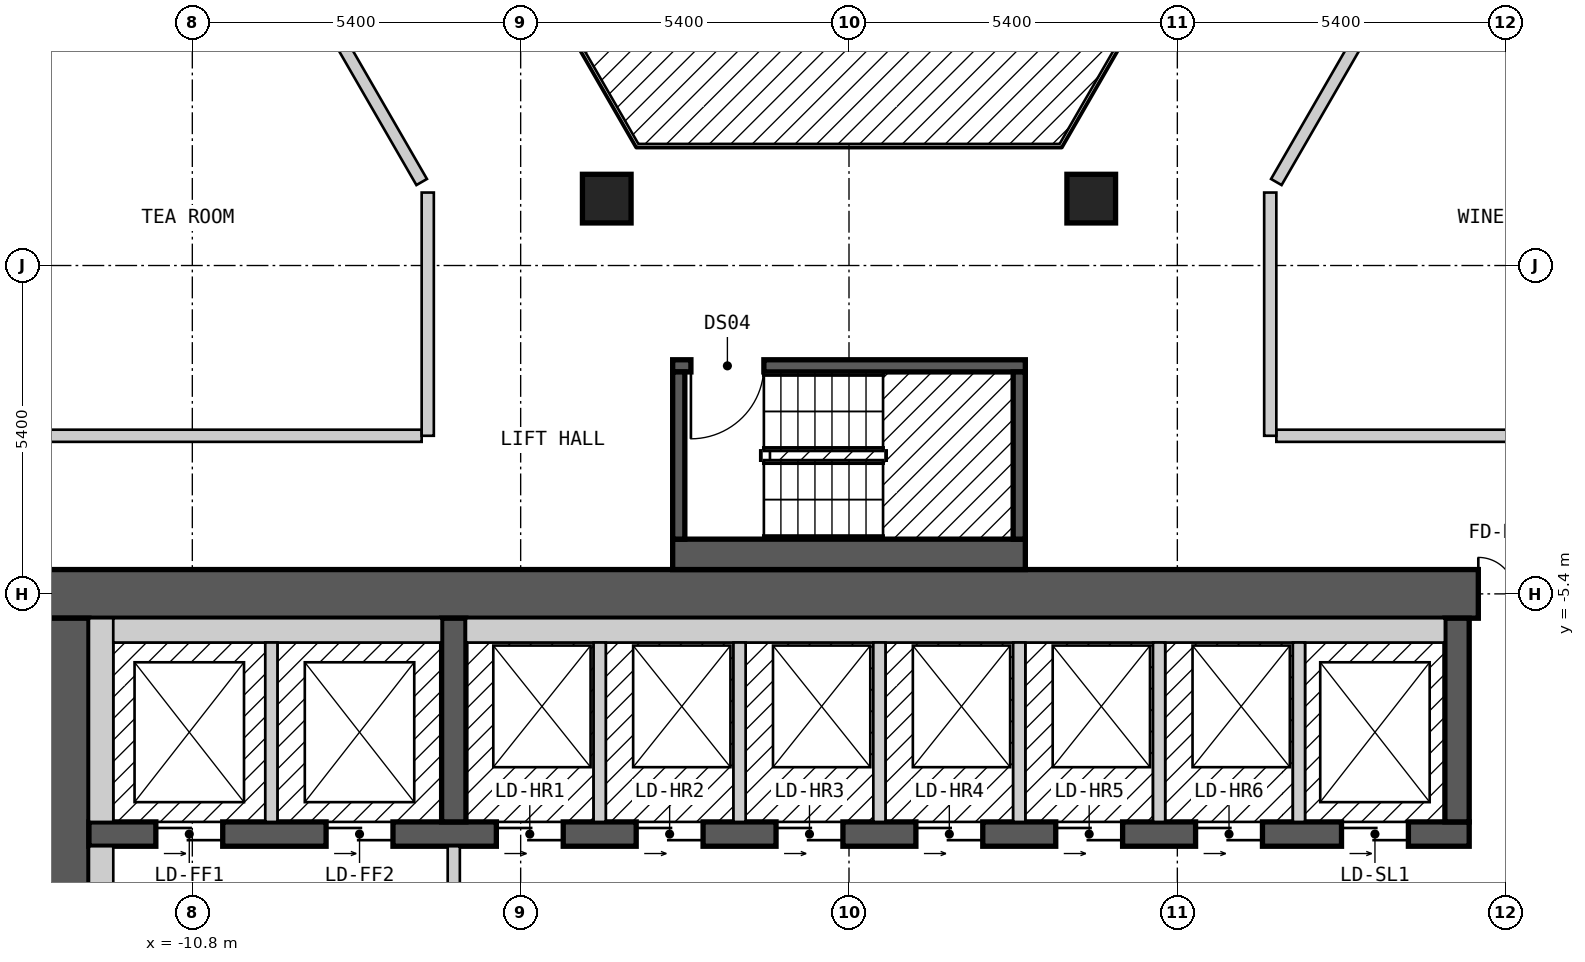
"""IFC4 building model, lengths in metres.
Left out: names, types, materials, properties, quantities, classifications, styles, units other than length and angle.
Written with IfcOpenShell. Run it as: python <this file> out.ifc"""

import sys

from ifc_helpers import new_model, si_unit, direction, frame, frame_2d, origin, origin_2d, place, context, subcontext, project, spatial, rectangle, extrude, element, fill, save


model = new_model("IFC4")
c1 = context("Model", 3, precision=1e-05, world=origin(), true_north=direction((0.0, 1.0)))
c2 = subcontext(c1, "Body", "Model", "MODEL_VIEW")
j1 = project(units=[si_unit("LENGTHUNIT", "METRE"), si_unit("PLANEANGLEUNIT", "RADIAN")], contexts=[c1])
p1 = place(None, origin())
s1 = spatial("IfcSite", under=j1, at=p1, CompositionType="ELEMENT")
p2 = place(p1, origin())
s2 = spatial("IfcBuilding", under=s1, at=p2, CompositionType="ELEMENT")
p3 = place(p2, frame((0.0, 0.0, 117.6)))
s3 = spatial("IfcBuildingStorey", under=s2, at=p3, CompositionType="ELEMENT", Elevation=117.6)
for number, where, z_axis, x_axis in (
    (1, (3.984, 1.1, 0.0), (0.0, 0.0, 1.0), (1.0, 0.0, 0.0)),
    (2, (-3.984, 1.1, 0.0), (0.0, 0.0, 1.0), (1.0, 0.0, 0.0)),
):
    element("IfcColumn", number, at=place(p3, frame(where, z_axis=z_axis, x_axis=x_axis)), inside=s3, PredefinedType="COLUMN", context=c2, shape_type="SweptSolid", body=[
        extrude(rectangle(XDim=0.8, YDim=0.8, at=origin_2d()), origin(), (0.0, 0.0, 1.0), 3.0),
    ])
p4 = place(p3, frame((-13.3, -5.4, 0.0), z_axis=(0.0, 0.0, 1.0), x_axis=(1.0, 0.0, 0.0)))
e3 = element("IfcWall", 3, at=p4, inside=s3, PredefinedType="SHEAR", context=c2, shape_type="SweptSolid", body=[
    extrude(rectangle(XDim=26.6, YDim=0.8, at=frame_2d((13.3, 0.0))), origin(), (0.0, 0.0, 1.0), 2.7),
])
p5 = place(p4, frame((23.65, 0.0, 0.0)))
e4 = element("IfcOpeningElement", 4, at=p5, cuts=e3, PredefinedType="OPENING", context=c2, shape_type="SweptSolid", body=[
    extrude(rectangle(XDim=1.2, YDim=2.1, at=frame_2d((0.6, 1.05))), frame((0.0, 0.41, 0.0), z_axis=(0.0, -1.0, 0.0), x_axis=(1.0, 0.0, 0.0)), (0.0, 0.0, 1.0), 0.82),
])
p6 = place(p3, frame((-12.9, -18.2, 0.0), z_axis=(0.0, 0.0, 1.0), x_axis=(0.0, 1.0, 0.0)))
e5 = element("IfcWall", 5, at=p6, inside=s3, PredefinedType="SHEAR", context=c2, shape_type="SweptSolid", body=[
    extrude(rectangle(XDim=12.4, YDim=0.8, at=frame_2d((6.2, 0.0))), origin(), (0.0, 0.0, 1.0), 2.7),
])
p7 = place(p6, frame((4.0, 0.0, 0.0)))
e6 = element("IfcOpeningElement", 6, at=p7, cuts=e5, PredefinedType="OPENING", context=c2, shape_type="SweptSolid", body=[
    extrude(rectangle(XDim=1.2, YDim=2.1, at=frame_2d((0.6, 1.05))), frame((0.0, 0.41, 0.0), z_axis=(0.0, -1.0, 0.0), x_axis=(1.0, 0.0, 0.0)), (0.0, 0.0, 1.0), 0.82),
])
p8 = place(p3, frame((-12.5, -9.35, 0.0), z_axis=(0.0, 0.0, 1.0), x_axis=(1.0, 0.0, 0.0)))
e7 = element("IfcWall", 7, at=p8, inside=s3, PredefinedType="SHEAR", context=c2, shape_type="SweptSolid", body=[
    extrude(rectangle(XDim=22.7, YDim=0.4, at=frame_2d((11.35, 0.0))), origin(), (0.0, 0.0, 1.0), 2.7),
])
p9 = place(p8, frame((1.1, 0.0, 0.0)))
e8 = element("IfcOpeningElement", 8, at=p9, cuts=e7, PredefinedType="OPENING", context=c2, shape_type="SweptSolid", body=[
    extrude(rectangle(XDim=1.1, YDim=2.1, at=frame_2d((0.55, 1.05))), frame((0.0, 0.21, 0.0), z_axis=(0.0, -1.0, 0.0), x_axis=(1.0, 0.0, 0.0)), (0.0, 0.0, 1.0), 0.42),
])
p10 = place(p8, frame((3.9, 0.0, 0.0)))
e9 = element("IfcOpeningElement", 9, at=p10, cuts=e7, PredefinedType="OPENING", context=c2, shape_type="SweptSolid", body=[
    extrude(rectangle(XDim=1.1, YDim=2.1, at=frame_2d((0.55, 1.05))), frame((0.0, 0.21, 0.0), z_axis=(0.0, -1.0, 0.0), x_axis=(1.0, 0.0, 0.0)), (0.0, 0.0, 1.0), 0.42),
])
p11 = place(p8, frame((6.7, 0.0, 0.0)))
e10 = element("IfcOpeningElement", 10, at=p11, cuts=e7, PredefinedType="OPENING", context=c2, shape_type="SweptSolid", body=[
    extrude(rectangle(XDim=1.1, YDim=2.1, at=frame_2d((0.55, 1.05))), frame((0.0, 0.21, 0.0), z_axis=(0.0, -1.0, 0.0), x_axis=(1.0, 0.0, 0.0)), (0.0, 0.0, 1.0), 0.42),
])
p12 = place(p8, frame((9.0, 0.0, 0.0)))
e11 = element("IfcOpeningElement", 11, at=p12, cuts=e7, PredefinedType="OPENING", context=c2, shape_type="SweptSolid", body=[
    extrude(rectangle(XDim=1.1, YDim=2.1, at=frame_2d((0.55, 1.05))), frame((0.0, 0.21, 0.0), z_axis=(0.0, -1.0, 0.0), x_axis=(1.0, 0.0, 0.0)), (0.0, 0.0, 1.0), 0.42),
])
p13 = place(p8, frame((11.3, 0.0, 0.0)))
e12 = element("IfcOpeningElement", 12, at=p13, cuts=e7, PredefinedType="OPENING", context=c2, shape_type="SweptSolid", body=[
    extrude(rectangle(XDim=1.1, YDim=2.1, at=frame_2d((0.55, 1.05))), frame((0.0, 0.21, 0.0), z_axis=(0.0, -1.0, 0.0), x_axis=(1.0, 0.0, 0.0)), (0.0, 0.0, 1.0), 0.42),
])
p14 = place(p8, frame((13.6, 0.0, 0.0)))
e13 = element("IfcOpeningElement", 13, at=p14, cuts=e7, PredefinedType="OPENING", context=c2, shape_type="SweptSolid", body=[
    extrude(rectangle(XDim=1.1, YDim=2.1, at=frame_2d((0.55, 1.05))), frame((0.0, 0.21, 0.0), z_axis=(0.0, -1.0, 0.0), x_axis=(1.0, 0.0, 0.0)), (0.0, 0.0, 1.0), 0.42),
])
p15 = place(p8, frame((15.9, 0.0, 0.0)))
e14 = element("IfcOpeningElement", 14, at=p15, cuts=e7, PredefinedType="OPENING", context=c2, shape_type="SweptSolid", body=[
    extrude(rectangle(XDim=1.1, YDim=2.1, at=frame_2d((0.55, 1.05))), frame((0.0, 0.21, 0.0), z_axis=(0.0, -1.0, 0.0), x_axis=(1.0, 0.0, 0.0)), (0.0, 0.0, 1.0), 0.42),
])
p16 = place(p8, frame((18.2, 0.0, 0.0)))
e15 = element("IfcOpeningElement", 15, at=p16, cuts=e7, PredefinedType="OPENING", context=c2, shape_type="SweptSolid", body=[
    extrude(rectangle(XDim=1.1, YDim=2.1, at=frame_2d((0.55, 1.05))), frame((0.0, 0.21, 0.0), z_axis=(0.0, -1.0, 0.0), x_axis=(1.0, 0.0, 0.0)), (0.0, 0.0, 1.0), 0.42),
])
p17 = place(p8, frame((20.6, 0.0, 0.0)))
e16 = element("IfcOpeningElement", 16, at=p17, cuts=e7, PredefinedType="OPENING", context=c2, shape_type="SweptSolid", body=[
    extrude(rectangle(XDim=1.1, YDim=2.1, at=frame_2d((0.55, 1.05))), frame((0.0, 0.21, 0.0), z_axis=(0.0, -1.0, 0.0), x_axis=(1.0, 0.0, 0.0)), (0.0, 0.0, 1.0), 0.42),
])
for number, where, z_axis, x_axis in (
    (17, (-6.5, -9.15, 0.0), (0.0, 0.0, 1.0), (0.0, 1.0, 0.0)),
    (18, (10.0, -9.15, 0.0), (0.0, 0.0, 1.0), (0.0, 1.0, 0.0)),
):
    element("IfcWall", number, at=place(p3, frame(where, z_axis=z_axis, x_axis=x_axis)), inside=s3, PredefinedType="SHEAR", context=c2, shape_type="SweptSolid", body=[
        extrude(rectangle(XDim=3.35, YDim=0.4, at=frame_2d((1.675, 0.0))), origin(), (0.0, 0.0, 1.0), 2.7),
    ])
p18 = place(p3, frame((-2.9, -4.75, 0.0), z_axis=(0.0, 0.0, 1.0), x_axis=(1.0, 0.0, 0.0)))
e19 = element("IfcWall", 19, at=p18, inside=s3, PredefinedType="SOLIDWALL", context=c2, shape_type="SweptSolid", body=[
    extrude(rectangle(XDim=5.8, YDim=0.5, at=frame_2d((2.9, 0.0))), origin(), (0.0, 0.0, 1.0), 2.7),
])
p19 = place(p3, frame((-2.9, -1.65, 0.0), z_axis=(0.0, 0.0, 1.0), x_axis=(1.0, 0.0, 0.0)))
e20 = element("IfcWall", 20, at=p19, inside=s3, PredefinedType="SOLIDWALL", context=c2, shape_type="SweptSolid", body=[
    extrude(rectangle(XDim=5.8, YDim=0.2, at=frame_2d((2.9, 0.0))), origin(), (0.0, 0.0, 1.0), 2.7),
])
p20 = place(p19, frame((0.3, 0.0, 0.0)))
e21 = element("IfcOpeningElement", 21, at=p20, cuts=e20, PredefinedType="OPENING", context=c2, shape_type="SweptSolid", body=[
    extrude(rectangle(XDim=1.2, YDim=2.1, at=frame_2d((0.6, 1.05))), frame((0.0, 0.11, 0.0), z_axis=(0.0, -1.0, 0.0), x_axis=(1.0, 0.0, 0.0)), (0.0, 0.0, 1.0), 0.22),
])
for number, where, z_axis, x_axis in (
    (22, (-2.8, -4.5, 0.0), (0.0, 0.0, 1.0), (0.0, 1.0, 0.0)),
    (23, (2.8, -4.5, 0.0), (0.0, 0.0, 1.0), (0.0, 1.0, 0.0)),
):
    element("IfcWall", number, at=place(p3, frame(where, z_axis=z_axis, x_axis=x_axis)), inside=s3, PredefinedType="SOLIDWALL", context=c2, shape_type="SweptSolid", body=[
        extrude(rectangle(XDim=2.75, YDim=0.2, at=frame_2d((1.375, 0.0))), origin(), (0.0, 0.0, 1.0), 2.7),
    ])
p21 = place(p3, frame((-10.796, 7.9, 0.0), z_axis=(0.0, 0.0, 1.0), x_axis=(0.499954271211, -0.866051803703, 0.0)))
e24 = element("IfcWall", 24, at=p21, inside=s3, PredefinedType="PARTITIONING", context=c2, shape_type="SweptSolid", body=[
    extrude(rectangle(XDim=7.536, YDim=0.2, at=frame_2d((3.768, 0.0))), origin(), (0.0, 0.0, 1.0), 2.7),
])
p22 = place(p3, frame((7.967, 13.0, 0.0), z_axis=(0.0, 0.0, 1.0), x_axis=(0.50003774998, -0.866003607726, 0.0)))
e25 = element("IfcWall", 25, at=p22, inside=s3, PredefinedType="PARTITIONING", context=c2, shape_type="SweptSolid", body=[
    extrude(rectangle(XDim=14.433, YDim=0.2, at=frame_2d((7.217, 0.0))), origin(), (0.0, 0.0, 1.0), 2.7),
])
p23 = place(p22, frame((6.824, 0.0, 0.0)))
e26 = element("IfcOpeningElement", 26, at=p23, cuts=e25, PredefinedType="OPENING", context=c2, shape_type="SweptSolid", body=[
    extrude(rectangle(XDim=0.9, YDim=2.1, at=frame_2d((0.45, 1.05))), frame((0.0, 0.11, 0.0), z_axis=(0.0, -1.0, 0.0), x_axis=(1.0, 0.0, 0.0)), (0.0, 0.0, 1.0), 0.22),
])
p24 = place(p3, frame((9.296, 15.1, 0.0), z_axis=(0.0, 0.0, 1.0), x_axis=(0.499974024244, -0.866040400375, 0.0)))
e27 = element("IfcWall", 27, at=p24, inside=s3, PredefinedType="PARTITIONING", context=c2, shape_type="SweptSolid", body=[
    extrude(rectangle(XDim=16.857, YDim=0.2, at=frame_2d((8.429, 0.0))), origin(), (0.0, 0.0, 1.0), 2.7),
])
p25 = place(p24, frame((5.187, 0.0, 0.0)))
e28 = element("IfcOpeningElement", 28, at=p25, cuts=e27, PredefinedType="OPENING", context=c2, shape_type="SweptSolid", body=[
    extrude(rectangle(XDim=1.0, YDim=2.1, at=frame_2d((0.5, 1.05))), frame((0.0, 0.11, 0.0), z_axis=(0.0, -1.0, 0.0), x_axis=(1.0, 0.0, 0.0)), (0.0, 0.0, 1.0), 0.22),
])
p26 = place(p3, frame((-13.395, -2.8, 0.0), z_axis=(0.0, 0.0, 1.0), x_axis=(1.0, 0.0, 0.0)))
e29 = element("IfcWall", 29, at=p26, inside=s3, PredefinedType="PARTITIONING", context=c2, shape_type="SweptSolid", body=[
    extrude(rectangle(XDim=6.367, YDim=0.2, at=frame_2d((3.184, 0.0))), origin(), (0.0, 0.0, 1.0), 2.7),
])
p27 = place(p3, frame((7.028, -2.8, 0.0), z_axis=(0.0, 0.0, 1.0), x_axis=(1.0, 0.0, 0.0)))
e30 = element("IfcWall", 30, at=p27, inside=s3, PredefinedType="PARTITIONING", context=c2, shape_type="SweptSolid", body=[
    extrude(rectangle(XDim=6.25, YDim=0.2, at=frame_2d((3.125, 0.0))), origin(), (0.0, 0.0, 1.0), 2.7),
])
p28 = place(p3, frame((7.028, 1.373, 0.0), z_axis=(0.0, 0.0, 1.0), x_axis=(0.499954271211, 0.866051803703, 0.0)))
e31 = element("IfcWall", 31, at=p28, inside=s3, PredefinedType="PARTITIONING", context=c2, shape_type="SweptSolid", body=[
    extrude(rectangle(XDim=7.536, YDim=0.2, at=frame_2d((3.768, 0.0))), origin(), (0.0, 0.0, 1.0), 2.7),
])
p29 = place(p3, frame((-15.242, 0.399, 0.0), z_axis=(0.0, 0.0, 1.0), x_axis=(0.499953615651, 0.866052182145, 0.0)))
e32 = element("IfcWall", 32, at=p29, inside=s3, PredefinedType="PARTITIONING", context=c2, shape_type="SweptSolid", body=[
    extrude(rectangle(XDim=8.777, YDim=0.2, at=frame_2d((4.388, 0.0))), origin(), (0.0, 0.0, 1.0), 2.7),
])
p30 = place(p29, frame((3.938, 0.0, 0.0)))
e33 = element("IfcOpeningElement", 33, at=p30, cuts=e32, PredefinedType="OPENING", context=c2, shape_type="SweptSolid", body=[
    extrude(rectangle(XDim=0.9, YDim=2.1, at=frame_2d((0.45, 1.05))), frame((0.0, 0.11, 0.0), z_axis=(0.0, -1.0, 0.0), x_axis=(1.0, 0.0, 0.0)), (0.0, 0.0, 1.0), 0.22),
])
p31 = place(p3, frame((-17.753, 0.45, 0.0), z_axis=(0.0, 0.0, 1.0), x_axis=(0.499988552313, 0.866032013009, 0.0)))
e34 = element("IfcWall", 34, at=p31, inside=s3, PredefinedType="PARTITIONING", context=c2, shape_type="SweptSolid", body=[
    extrude(rectangle(XDim=16.917, YDim=0.2, at=frame_2d((8.458, 0.0))), origin(), (0.0, 0.0, 1.0), 2.7),
])
p32 = place(p31, frame((10.73, 0.0, 0.0)))
e35 = element("IfcOpeningElement", 35, at=p32, cuts=e34, PredefinedType="OPENING", context=c2, shape_type="SweptSolid", body=[
    extrude(rectangle(XDim=1.0, YDim=2.1, at=frame_2d((0.5, 1.05))), frame((0.0, 0.11, 0.0), z_axis=(0.0, -1.0, 0.0), x_axis=(1.0, 0.0, 0.0)), (0.0, 0.0, 1.0), 0.22),
])
p33 = place(p31, frame((0.594, 0.0, 0.0)))
e36 = element("IfcOpeningElement", 36, at=p33, cuts=e34, PredefinedType="OPENING", context=c2, shape_type="SweptSolid", body=[
    extrude(rectangle(XDim=1.0, YDim=2.1, at=frame_2d((0.5, 1.05))), frame((0.0, 0.11, 0.0), z_axis=(0.0, -1.0, 0.0), x_axis=(1.0, 0.0, 0.0)), (0.0, 0.0, 1.0), 0.22),
])
for number, where, z_axis, x_axis in (
    (37, (6.928, -2.8, 0.0), (0.0, 0.0, 1.0), (0.0, 1.0, 0.0)),
    (38, (-6.928, -2.8, 0.0), (0.0, 0.0, 1.0), (0.0, 1.0, 0.0)),
):
    element("IfcWall", number, at=place(p3, frame(where, z_axis=z_axis, x_axis=x_axis)), inside=s3, PredefinedType="PARTITIONING", context=c2, shape_type="SweptSolid", body=[
        extrude(rectangle(XDim=4.0, YDim=0.2, at=frame_2d((2.0, 0.0))), origin(), (0.0, 0.0, 1.0), 2.7),
    ])
p34 = place(p3, frame((-12.3, -13.0, 0.0), z_axis=(0.0, 0.0, 1.0), x_axis=(0.0, 1.0, 0.0)))
e39 = element("IfcWall", 39, at=p34, inside=s3, PredefinedType="PARTITIONING", context=c2, shape_type="SweptSolid", body=[
    extrude(rectangle(XDim=3.45, YDim=0.4, at=frame_2d((1.725, 0.0))), origin(), (0.0, 0.0, 1.0), 2.7),
])
p35 = place(p3, frame((-12.3, -9.15, 0.0), z_axis=(0.0, 0.0, 1.0), x_axis=(0.0, 1.0, 0.0)))
e40 = element("IfcWall", 40, at=p35, inside=s3, PredefinedType="SOLIDWALL", context=c2, shape_type="SweptSolid", body=[
    extrude(rectangle(XDim=3.35, YDim=0.4, at=frame_2d((1.675, 0.0))), origin(), (0.0, 0.0, 1.0), 2.7),
])
p36 = place(p3, frame((-12.1, -6.0, 0.0), z_axis=(0.0, 0.0, 1.0), x_axis=(1.0, 0.0, 0.0)))
e41 = element("IfcWall", 41, at=p36, inside=s3, PredefinedType="SOLIDWALL", context=c2, shape_type="SweptSolid", body=[
    extrude(rectangle(XDim=5.4, YDim=0.4, at=frame_2d((2.7, 0.0))), origin(), (0.0, 0.0, 1.0), 2.7),
])
p37 = place(p3, frame((-9.5, -9.15, 0.0), z_axis=(0.0, 0.0, 1.0), x_axis=(0.0, 1.0, 0.0)))
e42 = element("IfcWall", 42, at=p37, inside=s3, PredefinedType="SOLIDWALL", context=c2, shape_type="SweptSolid", body=[
    extrude(rectangle(XDim=2.95, YDim=0.2, at=frame_2d((1.475, 0.0))), origin(), (0.0, 0.0, 1.0), 2.7),
])
p38 = place(p3, frame((-6.5, -14.45, 0.0), z_axis=(0.0, 0.0, 1.0), x_axis=(0.0, 1.0, 0.0)))
e43 = element("IfcWall", 43, at=p38, inside=s3, PredefinedType="PARTITIONING", context=c2, shape_type="SweptSolid", body=[
    extrude(rectangle(XDim=4.9, YDim=0.2, at=frame_2d((2.45, 0.0))), origin(), (0.0, 0.0, 1.0), 2.7),
])
p39 = place(p38, frame((3.15, 0.0, 0.0), z_axis=(0.0, 0.0, 1.0), x_axis=(-1.0, 0.0, 0.0)))
e44 = element("IfcOpeningElement", 44, at=p39, cuts=e43, PredefinedType="OPENING", context=c2, shape_type="SweptSolid", body=[
    extrude(rectangle(XDim=1.4, YDim=2.1, at=frame_2d((0.7, 1.05))), frame((0.0, 0.11, 0.0), z_axis=(0.0, -1.0, 0.0), x_axis=(1.0, 0.0, 0.0)), (0.0, 0.0, 1.0), 0.22),
])
p40 = place(p3, frame((-6.3, -6.0, 0.0), z_axis=(0.0, 0.0, 1.0), x_axis=(1.0, 0.0, 0.0)))
e45 = element("IfcWall", 45, at=p40, inside=s3, PredefinedType="SOLIDWALL", context=c2, shape_type="SweptSolid", body=[
    extrude(rectangle(XDim=16.1, YDim=0.4, at=frame_2d((8.05, 0.0))), origin(), (0.0, 0.0, 1.0), 2.7),
])
for number, where, z_axis, x_axis in (
    (46, (-4.1, -9.15, 0.0), (0.0, 0.0, 1.0), (0.0, 1.0, 0.0)),
    (47, (-1.8, -9.15, 0.0), (0.0, 0.0, 1.0), (0.0, 1.0, 0.0)),
    (48, (0.5, -9.15, 0.0), (0.0, 0.0, 1.0), (0.0, 1.0, 0.0)),
    (49, (2.8, -9.15, 0.0), (0.0, 0.0, 1.0), (0.0, 1.0, 0.0)),
    (50, (5.1, -9.15, 0.0), (0.0, 0.0, 1.0), (0.0, 1.0, 0.0)),
    (51, (7.4, -9.15, 0.0), (0.0, 0.0, 1.0), (0.0, 1.0, 0.0)),
):
    element("IfcWall", number, at=place(p3, frame(where, z_axis=z_axis, x_axis=x_axis)), inside=s3, PredefinedType="SOLIDWALL", context=c2, shape_type="SweptSolid", body=[
        extrude(rectangle(XDim=2.95, YDim=0.2, at=frame_2d((1.475, 0.0))), origin(), (0.0, 0.0, 1.0), 2.7),
    ])
p41 = place(p20, origin())
e52 = element("IfcDoor", 52, at=p41, inside=s3, OperationType="SINGLE_SWING_LEFT", PredefinedType="DOOR", context=c2, shape_type="SweptSolid", body=[
    extrude(rectangle(XDim=1.2, YDim=2.1, at=frame_2d((0.6, 1.05))), frame((0.0, 0.025, 0.0), z_axis=(0.0, -1.0, 0.0), x_axis=(1.0, 0.0, 0.0)), (0.0, 0.0, 1.0), 0.05),
])
fill(e21, e52)
p42 = place(p9, origin())
e53 = element("IfcDoor", 53, at=p42, inside=s3, OperationType="DOUBLE_DOOR_SLIDING", PredefinedType="DOOR", context=c2, shape_type="SweptSolid", body=[
    extrude(rectangle(XDim=1.1, YDim=2.1, at=frame_2d((0.55, 1.05))), frame((0.0, 0.025, 0.0), z_axis=(0.0, -1.0, 0.0), x_axis=(1.0, 0.0, 0.0)), (0.0, 0.0, 1.0), 0.05),
])
fill(e8, e53)
p43 = place(p10, origin())
e54 = element("IfcDoor", 54, at=p43, inside=s3, OperationType="DOUBLE_DOOR_SLIDING", PredefinedType="DOOR", context=c2, shape_type="SweptSolid", body=[
    extrude(rectangle(XDim=1.1, YDim=2.1, at=frame_2d((0.55, 1.05))), frame((0.0, 0.025, 0.0), z_axis=(0.0, -1.0, 0.0), x_axis=(1.0, 0.0, 0.0)), (0.0, 0.0, 1.0), 0.05),
])
fill(e9, e54)
p44 = place(p11, origin())
e55 = element("IfcDoor", 55, at=p44, inside=s3, OperationType="DOUBLE_DOOR_SLIDING", PredefinedType="DOOR", context=c2, shape_type="SweptSolid", body=[
    extrude(rectangle(XDim=1.1, YDim=2.1, at=frame_2d((0.55, 1.05))), frame((0.0, 0.025, 0.0), z_axis=(0.0, -1.0, 0.0), x_axis=(1.0, 0.0, 0.0)), (0.0, 0.0, 1.0), 0.05),
])
fill(e10, e55)
p45 = place(p12, origin())
e56 = element("IfcDoor", 56, at=p45, inside=s3, OperationType="DOUBLE_DOOR_SLIDING", PredefinedType="DOOR", context=c2, shape_type="SweptSolid", body=[
    extrude(rectangle(XDim=1.1, YDim=2.1, at=frame_2d((0.55, 1.05))), frame((0.0, 0.025, 0.0), z_axis=(0.0, -1.0, 0.0), x_axis=(1.0, 0.0, 0.0)), (0.0, 0.0, 1.0), 0.05),
])
fill(e11, e56)
p46 = place(p13, origin())
e57 = element("IfcDoor", 57, at=p46, inside=s3, OperationType="DOUBLE_DOOR_SLIDING", PredefinedType="DOOR", context=c2, shape_type="SweptSolid", body=[
    extrude(rectangle(XDim=1.1, YDim=2.1, at=frame_2d((0.55, 1.05))), frame((0.0, 0.025, 0.0), z_axis=(0.0, -1.0, 0.0), x_axis=(1.0, 0.0, 0.0)), (0.0, 0.0, 1.0), 0.05),
])
fill(e12, e57)
p47 = place(p14, origin())
e58 = element("IfcDoor", 58, at=p47, inside=s3, OperationType="DOUBLE_DOOR_SLIDING", PredefinedType="DOOR", context=c2, shape_type="SweptSolid", body=[
    extrude(rectangle(XDim=1.1, YDim=2.1, at=frame_2d((0.55, 1.05))), frame((0.0, 0.025, 0.0), z_axis=(0.0, -1.0, 0.0), x_axis=(1.0, 0.0, 0.0)), (0.0, 0.0, 1.0), 0.05),
])
fill(e13, e58)
p48 = place(p15, origin())
e59 = element("IfcDoor", 59, at=p48, inside=s3, OperationType="DOUBLE_DOOR_SLIDING", PredefinedType="DOOR", context=c2, shape_type="SweptSolid", body=[
    extrude(rectangle(XDim=1.1, YDim=2.1, at=frame_2d((0.55, 1.05))), frame((0.0, 0.025, 0.0), z_axis=(0.0, -1.0, 0.0), x_axis=(1.0, 0.0, 0.0)), (0.0, 0.0, 1.0), 0.05),
])
fill(e14, e59)
p49 = place(p16, origin())
e60 = element("IfcDoor", 60, at=p49, inside=s3, OperationType="DOUBLE_DOOR_SLIDING", PredefinedType="DOOR", context=c2, shape_type="SweptSolid", body=[
    extrude(rectangle(XDim=1.1, YDim=2.1, at=frame_2d((0.55, 1.05))), frame((0.0, 0.025, 0.0), z_axis=(0.0, -1.0, 0.0), x_axis=(1.0, 0.0, 0.0)), (0.0, 0.0, 1.0), 0.05),
])
fill(e15, e60)
p50 = place(p17, origin())
e61 = element("IfcDoor", 61, at=p50, inside=s3, OperationType="DOUBLE_DOOR_SLIDING", PredefinedType="DOOR", context=c2, shape_type="SweptSolid", body=[
    extrude(rectangle(XDim=1.1, YDim=2.1, at=frame_2d((0.55, 1.05))), frame((0.0, 0.025, 0.0), z_axis=(0.0, -1.0, 0.0), x_axis=(1.0, 0.0, 0.0)), (0.0, 0.0, 1.0), 0.05),
])
fill(e16, e61)
p51 = place(p5, origin())
e62 = element("IfcDoor", 62, at=p51, inside=s3, OperationType="DOUBLE_DOOR_SINGLE_SWING", PredefinedType="DOOR", context=c2, shape_type="SweptSolid", body=[
    extrude(rectangle(XDim=1.2, YDim=2.1, at=frame_2d((0.6, 1.05))), frame((0.0, 0.025, 0.0), z_axis=(0.0, -1.0, 0.0), x_axis=(1.0, 0.0, 0.0)), (0.0, 0.0, 1.0), 0.05),
])
fill(e4, e62)
save(model, sys.argv[1])
